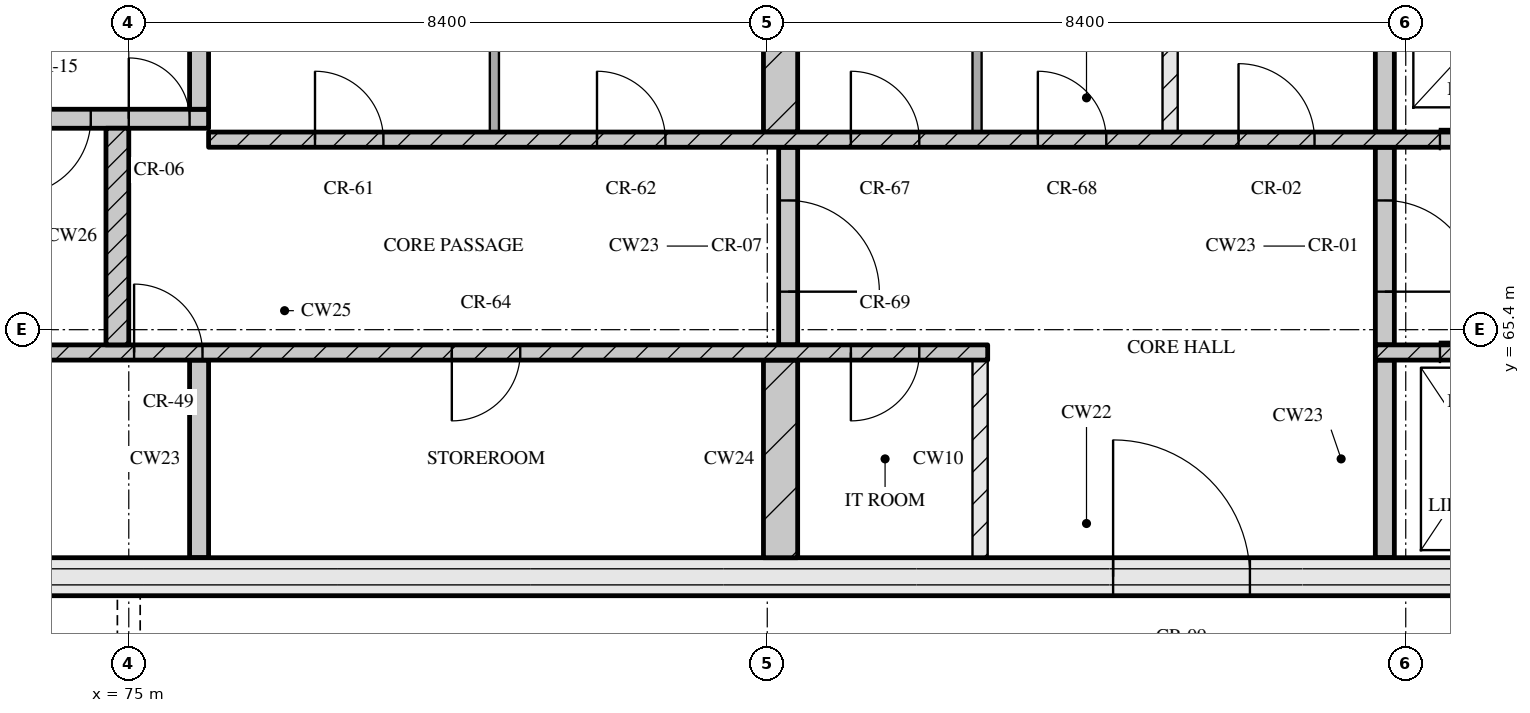
"""IFC4 building model, lengths in metres.
Left out: names, types, materials, properties, quantities, classifications, styles, units other than length and angle.
Written with IfcOpenShell. Run it as: python <this file> out.ifc"""

import sys

from ifc_helpers import new_model, si_unit, direction, frame, frame_2d, origin, place, context, subcontext, project, spatial, rectangle, extrude, element, fill, save


model = new_model("IFC4")
c1 = context("Model", 3, precision=1e-05, world=origin(), true_north=direction((0.0, 1.0)))
c2 = subcontext(c1, "Body", "Model", "MODEL_VIEW")
j1 = project(units=[si_unit("LENGTHUNIT", "METRE"), si_unit("PLANEANGLEUNIT", "RADIAN")], contexts=[c1])
p1 = place(None, origin())
s1 = spatial("IfcSite", under=j1, at=p1, CompositionType="ELEMENT")
p2 = place(p1, origin())
s2 = spatial("IfcBuilding", under=s1, at=p2, CompositionType="ELEMENT")
p3 = place(p2, frame((0.0, 0.0, 306.75)))
s3 = spatial("IfcBuildingStorey", under=s2, at=p3, CompositionType="ELEMENT", Elevation=306.75)
p4 = place(p3, frame((67.3, 62.15, 0.0), z_axis=(0.0, 0.0, 1.0), x_axis=(1.0, 0.0, 0.0)))
e1 = element("IfcWall", 1, at=p4, inside=s3, PredefinedType="SOLIDWALL", context=c2, shape_type="SweptSolid", body=[
    extrude(rectangle(XDim=40.6, YDim=0.5, at=frame_2d((20.3, 0.0))), origin(), (0.0, 0.0, 1.0), 3.3),
])
p5 = place(p4, frame((20.65, 0.0, 0.0)))
e2 = element("IfcOpeningElement", 2, at=p5, cuts=e1, PredefinedType="OPENING", context=c2, shape_type="SweptSolid", body=[
    extrude(rectangle(XDim=1.8, YDim=2.1, at=frame_2d((0.9, 1.05))), frame((0.0, 0.26, 0.0), z_axis=(0.0, -1.0, 0.0), x_axis=(1.0, 0.0, 0.0)), (0.0, 0.0, 1.0), 0.52),
])
p6 = place(p3, frame((75.925, 62.4, 0.0), z_axis=(0.0, 0.0, 1.0), x_axis=(0.0, 1.0, 0.0)))
e3 = element("IfcWall", 3, at=p6, inside=s3, PredefinedType="SOLIDWALL", context=c2, shape_type="SweptSolid", body=[
    extrude(rectangle(XDim=2.6, YDim=0.25, at=frame_2d((1.3, 0.0))), origin(), (0.0, 0.0, 1.0), 3.3),
])
p7 = place(p3, frame((83.575, 62.4, 0.0), z_axis=(0.0, 0.0, 1.0), x_axis=(0.0, 1.0, 0.0)))
e4 = element("IfcWall", 4, at=p7, inside=s3, PredefinedType="SOLIDWALL", context=c2, shape_type="SweptSolid", body=[
    extrude(rectangle(XDim=2.6, YDim=0.45, at=frame_2d((1.3, 0.0))), origin(), (0.0, 0.0, 1.0), 3.3),
])
p8 = place(p3, frame((86.2, 62.4, 0.0), z_axis=(0.0, 0.0, 1.0), x_axis=(0.0, 1.0, 0.0)))
e5 = element("IfcWall", 5, at=p8, inside=s3, PredefinedType="PARTITIONING", context=c2, shape_type="SweptSolid", body=[
    extrude(rectangle(XDim=2.6, YDim=0.2, at=frame_2d((1.3, 0.0))), origin(), (0.0, 0.0, 1.0), 3.3),
])
p9 = place(p3, frame((91.525, 62.4, 0.0), z_axis=(0.0, 0.0, 1.0), x_axis=(0.0, 1.0, 0.0)))
e6 = element("IfcWall", 6, at=p9, inside=s3, PredefinedType="SOLIDWALL", context=c2, shape_type="SweptSolid", body=[
    extrude(rectangle(XDim=2.6, YDim=0.25, at=frame_2d((1.3, 0.0))), origin(), (0.0, 0.0, 1.0), 3.3),
])
p10 = place(p3, frame((67.8, 65.1, 0.0), z_axis=(0.0, 0.0, 1.0), x_axis=(1.0, 0.0, 0.0)))
e7 = element("IfcWall", 7, at=p10, inside=s3, PredefinedType="SOLIDWALL", context=c2, shape_type="SweptSolid", body=[
    extrude(rectangle(XDim=18.5, YDim=0.2, at=frame_2d((9.25, 0.0))), origin(), (0.0, 0.0, 1.0), 3.3),
])
p11 = place(p10, frame((7.27, 0.0, 0.0)))
e8 = element("IfcOpeningElement", 8, at=p11, cuts=e7, PredefinedType="OPENING", context=c2, shape_type="SweptSolid", body=[
    extrude(rectangle(XDim=0.9, YDim=2.1, at=frame_2d((0.45, 1.05))), frame((0.0, 0.11, 0.0), z_axis=(0.0, -1.0, 0.0), x_axis=(1.0, 0.0, 0.0)), (0.0, 0.0, 1.0), 0.22),
])
p12 = place(p10, frame((11.45, 0.0, 0.0)))
e9 = element("IfcOpeningElement", 9, at=p12, cuts=e7, PredefinedType="OPENING", context=c2, shape_type="SweptSolid", body=[
    extrude(rectangle(XDim=0.9, YDim=2.1, at=frame_2d((0.45, 1.05))), frame((0.0, 0.11, 0.0), z_axis=(0.0, -1.0, 0.0), x_axis=(1.0, 0.0, 0.0)), (0.0, 0.0, 1.0), 0.22),
])
p13 = place(p10, frame((16.7, 0.0, 0.0)))
e10 = element("IfcOpeningElement", 10, at=p13, cuts=e7, PredefinedType="OPENING", context=c2, shape_type="SweptSolid", body=[
    extrude(rectangle(XDim=0.9, YDim=2.1, at=frame_2d((0.45, 1.05))), frame((0.0, 0.11, 0.0), z_axis=(0.0, -1.0, 0.0), x_axis=(1.0, 0.0, 0.0)), (0.0, 0.0, 1.0), 0.22),
])
p14 = place(p3, frame((91.4, 65.1, 0.0), z_axis=(0.0, 0.0, 1.0), x_axis=(1.0, 0.0, 0.0)))
e11 = element("IfcWall", 11, at=p14, inside=s3, PredefinedType="SOLIDWALL", context=c2, shape_type="SweptSolid", body=[
    extrude(rectangle(XDim=16.0, YDim=0.2, at=frame_2d((8.0, 0.0))), origin(), (0.0, 0.0, 1.0), 3.3),
])
p15 = place(p14, frame((0.85, 0.0, 0.0)))
e12 = element("IfcOpeningElement", 12, at=p15, cuts=e11, PredefinedType="OPENING", context=c2, shape_type="SweptSolid", body=[
    extrude(rectangle(XDim=1.1, YDim=2.1, at=frame_2d((0.55, 1.05))), frame((0.0, 0.11, 0.0), z_axis=(0.0, -1.0, 0.0), x_axis=(1.0, 0.0, 0.0)), (0.0, 0.0, 1.0), 0.22),
])
p16 = place(p14, frame((3.35, 0.0, 0.0)))
e13 = element("IfcOpeningElement", 13, at=p16, cuts=e11, PredefinedType="OPENING", context=c2, shape_type="SweptSolid", body=[
    extrude(rectangle(XDim=1.1, YDim=2.1, at=frame_2d((0.55, 1.05))), frame((0.0, 0.11, 0.0), z_axis=(0.0, -1.0, 0.0), x_axis=(1.0, 0.0, 0.0)), (0.0, 0.0, 1.0), 0.22),
])
p17 = place(p14, frame((5.85, 0.0, 0.0)))
e14 = element("IfcOpeningElement", 14, at=p17, cuts=e11, PredefinedType="OPENING", context=c2, shape_type="SweptSolid", body=[
    extrude(rectangle(XDim=1.1, YDim=2.1, at=frame_2d((0.55, 1.05))), frame((0.0, 0.11, 0.0), z_axis=(0.0, -1.0, 0.0), x_axis=(1.0, 0.0, 0.0)), (0.0, 0.0, 1.0), 0.22),
])
p18 = place(p14, frame((7.83, 0.0, 0.0)))
e15 = element("IfcOpeningElement", 15, at=p18, cuts=e11, PredefinedType="OPENING", context=c2, shape_type="SweptSolid", body=[
    extrude(rectangle(XDim=0.9, YDim=2.1, at=frame_2d((0.45, 1.05))), frame((0.0, 0.11, 0.0), z_axis=(0.0, -1.0, 0.0), x_axis=(1.0, 0.0, 0.0)), (0.0, 0.0, 1.0), 0.22),
])
p19 = place(p3, frame((74.85, 65.2, 0.0), z_axis=(0.0, 0.0, 1.0), x_axis=(0.0, 1.0, 0.0)))
e16 = element("IfcWall", 16, at=p19, inside=s3, PredefinedType="SOLIDWALL", context=c2, shape_type="SweptSolid", body=[
    extrude(rectangle(XDim=2.85, YDim=0.3, at=frame_2d((1.425, 0.0))), origin(), (0.0, 0.0, 1.0), 3.3),
])
p20 = place(p3, frame((83.675, 65.2, 0.0), z_axis=(0.0, 0.0, 1.0), x_axis=(0.0, 1.0, 0.0)))
e17 = element("IfcWall", 17, at=p20, inside=s3, PredefinedType="SOLIDWALL", context=c2, shape_type="SweptSolid", body=[
    extrude(rectangle(XDim=2.6, YDim=0.25, at=frame_2d((1.3, 0.0))), origin(), (0.0, 0.0, 1.0), 3.3),
])
p21 = place(p20, frame((0.7, 0.0, 0.0)))
e18 = element("IfcOpeningElement", 18, at=p21, cuts=e17, PredefinedType="OPENING", context=c2, shape_type="SweptSolid", body=[
    extrude(rectangle(XDim=1.2, YDim=2.1, at=frame_2d((0.6, 1.05))), frame((0.0, 0.135, 0.0), z_axis=(0.0, -1.0, 0.0), x_axis=(1.0, 0.0, 0.0)), (0.0, 0.0, 1.0), 0.27),
])
p22 = place(p3, frame((91.525, 65.2, 0.0), z_axis=(0.0, 0.0, 1.0), x_axis=(0.0, 1.0, 0.0)))
e19 = element("IfcWall", 19, at=p22, inside=s3, PredefinedType="SOLIDWALL", context=c2, shape_type="SweptSolid", body=[
    extrude(rectangle(XDim=2.6, YDim=0.25, at=frame_2d((1.3, 0.0))), origin(), (0.0, 0.0, 1.0), 3.3),
])
p23 = place(p22, frame((0.7, 0.0, 0.0)))
e20 = element("IfcOpeningElement", 20, at=p23, cuts=e19, PredefinedType="OPENING", context=c2, shape_type="SweptSolid", body=[
    extrude(rectangle(XDim=1.2, YDim=2.1, at=frame_2d((0.6, 1.05))), frame((0.0, 0.135, 0.0), z_axis=(0.0, -1.0, 0.0), x_axis=(1.0, 0.0, 0.0)), (0.0, 0.0, 1.0), 0.27),
])
p24 = place(p3, frame((76.05, 67.9, 0.0), z_axis=(0.0, 0.0, 1.0), x_axis=(1.0, 0.0, 0.0)))
e21 = element("IfcWall", 21, at=p24, inside=s3, PredefinedType="SOLIDWALL", context=c2, shape_type="SweptSolid", body=[
    extrude(rectangle(XDim=23.1, YDim=0.2, at=frame_2d((11.55, 0.0))), origin(), (0.0, 0.0, 1.0), 3.3),
])
p25 = place(p24, frame((1.4, 0.0, 0.0)))
e22 = element("IfcOpeningElement", 22, at=p25, cuts=e21, PredefinedType="OPENING", context=c2, shape_type="SweptSolid", body=[
    extrude(rectangle(XDim=0.9, YDim=2.1, at=frame_2d((0.45, 1.05))), frame((0.0, 0.11, 0.0), z_axis=(0.0, -1.0, 0.0), x_axis=(1.0, 0.0, 0.0)), (0.0, 0.0, 1.0), 0.22),
])
p26 = place(p24, frame((5.11, 0.0, 0.0)))
e23 = element("IfcOpeningElement", 23, at=p26, cuts=e21, PredefinedType="OPENING", context=c2, shape_type="SweptSolid", body=[
    extrude(rectangle(XDim=0.9, YDim=2.1, at=frame_2d((0.45, 1.05))), frame((0.0, 0.11, 0.0), z_axis=(0.0, -1.0, 0.0), x_axis=(1.0, 0.0, 0.0)), (0.0, 0.0, 1.0), 0.22),
])
p27 = place(p24, frame((8.45, 0.0, 0.0)))
e24 = element("IfcOpeningElement", 24, at=p27, cuts=e21, PredefinedType="OPENING", context=c2, shape_type="SweptSolid", body=[
    extrude(rectangle(XDim=0.9, YDim=2.1, at=frame_2d((0.45, 1.05))), frame((0.0, 0.11, 0.0), z_axis=(0.0, -1.0, 0.0), x_axis=(1.0, 0.0, 0.0)), (0.0, 0.0, 1.0), 0.22),
])
p28 = place(p24, frame((10.91, 0.0, 0.0)))
e25 = element("IfcOpeningElement", 25, at=p28, cuts=e21, PredefinedType="OPENING", context=c2, shape_type="SweptSolid", body=[
    extrude(rectangle(XDim=0.9, YDim=2.1, at=frame_2d((0.45, 1.05))), frame((0.0, 0.11, 0.0), z_axis=(0.0, -1.0, 0.0), x_axis=(1.0, 0.0, 0.0)), (0.0, 0.0, 1.0), 0.22),
])
p29 = place(p24, frame((13.55, 0.0, 0.0)))
e26 = element("IfcOpeningElement", 26, at=p29, cuts=e21, PredefinedType="OPENING", context=c2, shape_type="SweptSolid", body=[
    extrude(rectangle(XDim=1.0, YDim=2.1, at=frame_2d((0.5, 1.05))), frame((0.0, 0.11, 0.0), z_axis=(0.0, -1.0, 0.0), x_axis=(1.0, 0.0, 0.0)), (0.0, 0.0, 1.0), 0.22),
])
p30 = place(p24, frame((16.2, 0.0, 0.0)))
e27 = element("IfcOpeningElement", 27, at=p30, cuts=e21, PredefinedType="OPENING", context=c2, shape_type="SweptSolid", body=[
    extrude(rectangle(XDim=1.1, YDim=2.1, at=frame_2d((0.55, 1.05))), frame((0.0, 0.11, 0.0), z_axis=(0.0, -1.0, 0.0), x_axis=(1.0, 0.0, 0.0)), (0.0, 0.0, 1.0), 0.22),
])
p31 = place(p24, frame((18.7, 0.0, 0.0)))
e28 = element("IfcOpeningElement", 28, at=p31, cuts=e21, PredefinedType="OPENING", context=c2, shape_type="SweptSolid", body=[
    extrude(rectangle(XDim=1.1, YDim=2.1, at=frame_2d((0.55, 1.05))), frame((0.0, 0.11, 0.0), z_axis=(0.0, -1.0, 0.0), x_axis=(1.0, 0.0, 0.0)), (0.0, 0.0, 1.0), 0.22),
])
p32 = place(p24, frame((21.2, 0.0, 0.0)))
e29 = element("IfcOpeningElement", 29, at=p32, cuts=e21, PredefinedType="OPENING", context=c2, shape_type="SweptSolid", body=[
    extrude(rectangle(XDim=1.1, YDim=2.1, at=frame_2d((0.55, 1.05))), frame((0.0, 0.11, 0.0), z_axis=(0.0, -1.0, 0.0), x_axis=(1.0, 0.0, 0.0)), (0.0, 0.0, 1.0), 0.22),
])
p33 = place(p3, frame((79.81, 68.0, 0.0), z_axis=(0.0, 0.0, 1.0), x_axis=(0.0, 1.0, 0.0)))
e30 = element("IfcWall", 30, at=p33, inside=s3, PredefinedType="PARTITIONING", context=c2, shape_type="SweptSolid", body=[
    extrude(rectangle(XDim=2.6, YDim=0.12, at=frame_2d((1.3, 0.0))), origin(), (0.0, 0.0, 1.0), 3.3),
])
p34 = place(p3, frame((83.575, 68.0, 0.0), z_axis=(0.0, 0.0, 1.0), x_axis=(0.0, 1.0, 0.0)))
e31 = element("IfcWall", 31, at=p34, inside=s3, PredefinedType="SOLIDWALL", context=c2, shape_type="SweptSolid", body=[
    extrude(rectangle(XDim=2.6, YDim=0.45, at=frame_2d((1.3, 0.0))), origin(), (0.0, 0.0, 1.0), 3.3),
])
p35 = place(p3, frame((86.16, 68.0, 0.0), z_axis=(0.0, 0.0, 1.0), x_axis=(0.0, 1.0, 0.0)))
e32 = element("IfcWall", 32, at=p35, inside=s3, PredefinedType="PARTITIONING", context=c2, shape_type="SweptSolid", body=[
    extrude(rectangle(XDim=2.6, YDim=0.12, at=frame_2d((1.3, 0.0))), origin(), (0.0, 0.0, 1.0), 3.3),
])
p36 = place(p3, frame((88.7, 68.0, 0.0), z_axis=(0.0, 0.0, 1.0), x_axis=(0.0, 1.0, 0.0)))
e33 = element("IfcWall", 33, at=p36, inside=s3, PredefinedType="PARTITIONING", context=c2, shape_type="SweptSolid", body=[
    extrude(rectangle(XDim=2.6, YDim=0.2, at=frame_2d((1.3, 0.0))), origin(), (0.0, 0.0, 1.0), 3.3),
])
p37 = place(p3, frame((91.525, 68.0, 0.0), z_axis=(0.0, 0.0, 1.0), x_axis=(0.0, 1.0, 0.0)))
e34 = element("IfcWall", 34, at=p37, inside=s3, PredefinedType="SOLIDWALL", context=c2, shape_type="SweptSolid", body=[
    extrude(rectangle(XDim=2.6, YDim=0.25, at=frame_2d((1.3, 0.0))), origin(), (0.0, 0.0, 1.0), 3.3),
])
p38 = place(p3, frame((67.8, 68.175, 0.0), z_axis=(0.0, 0.0, 1.0), x_axis=(1.0, 0.0, 0.0)))
e35 = element("IfcWall", 35, at=p38, inside=s3, PredefinedType="SOLIDWALL", context=c2, shape_type="SweptSolid", body=[
    extrude(rectangle(XDim=8.25, YDim=0.25, at=frame_2d((4.125, 0.0))), origin(), (0.0, 0.0, 1.0), 3.3),
])
p39 = place(p38, frame((5.7, 0.0, 0.0)))
e36 = element("IfcOpeningElement", 36, at=p39, cuts=e35, PredefinedType="OPENING", context=c2, shape_type="SweptSolid", body=[
    extrude(rectangle(XDim=1.0, YDim=2.1, at=frame_2d((0.5, 1.05))), frame((0.0, 0.135, 0.0), z_axis=(0.0, -1.0, 0.0), x_axis=(1.0, 0.0, 0.0)), (0.0, 0.0, 1.0), 0.27),
])
p40 = place(p38, frame((7.2, 0.0, 0.0)))
e37 = element("IfcOpeningElement", 37, at=p40, cuts=e35, PredefinedType="OPENING", context=c2, shape_type="SweptSolid", body=[
    extrude(rectangle(XDim=0.8, YDim=2.1, at=frame_2d((0.4, 1.05))), frame((0.0, 0.135, 0.0), z_axis=(0.0, -1.0, 0.0), x_axis=(1.0, 0.0, 0.0)), (0.0, 0.0, 1.0), 0.27),
])
p41 = place(p3, frame((75.925, 68.3, 0.0), z_axis=(0.0, 0.0, 1.0), x_axis=(0.0, 1.0, 0.0)))
e38 = element("IfcWall", 38, at=p41, inside=s3, PredefinedType="SOLIDWALL", context=c2, shape_type="SweptSolid", body=[
    extrude(rectangle(XDim=2.3, YDim=0.25, at=frame_2d((1.15, 0.0))), origin(), (0.0, 0.0, 1.0), 3.3),
])
p42 = place(p5, origin())
e39 = element("IfcDoor", 39, at=p42, inside=s3, OperationType="DOUBLE_DOOR_SINGLE_SWING", PredefinedType="DOOR", context=c2, shape_type="SweptSolid", body=[
    extrude(rectangle(XDim=1.8, YDim=2.1, at=frame_2d((0.9, 1.05))), frame((0.0, 0.025, 0.0), z_axis=(0.0, -1.0, 0.0), x_axis=(1.0, 0.0, 0.0)), (0.0, 0.0, 1.0), 0.05),
])
fill(e2, e39)
p43 = place(p11, origin())
e40 = element("IfcDoor", 40, at=p43, inside=s3, OperationType="SINGLE_SWING_LEFT", PredefinedType="DOOR", context=c2, shape_type="SweptSolid", body=[
    extrude(rectangle(XDim=0.9, YDim=2.1, at=frame_2d((0.45, 1.05))), frame((0.0, 0.025, 0.0), z_axis=(0.0, -1.0, 0.0), x_axis=(1.0, 0.0, 0.0)), (0.0, 0.0, 1.0), 0.05),
])
fill(e8, e40)
p44 = place(p12, origin())
e41 = element("IfcDoor", 41, at=p44, inside=s3, OperationType="SINGLE_SWING_RIGHT", PredefinedType="DOOR", context=c2, shape_type="SweptSolid", body=[
    extrude(rectangle(XDim=0.9, YDim=2.1, at=frame_2d((0.45, 1.05))), frame((0.0, 0.025, 0.0), z_axis=(0.0, -1.0, 0.0), x_axis=(1.0, 0.0, 0.0)), (0.0, 0.0, 1.0), 0.05),
])
fill(e9, e41)
p45 = place(p13, origin())
e42 = element("IfcDoor", 42, at=p45, inside=s3, OperationType="SINGLE_SWING_RIGHT", PredefinedType="DOOR", context=c2, shape_type="SweptSolid", body=[
    extrude(rectangle(XDim=0.9, YDim=2.1, at=frame_2d((0.45, 1.05))), frame((0.0, 0.025, 0.0), z_axis=(0.0, -1.0, 0.0), x_axis=(1.0, 0.0, 0.0)), (0.0, 0.0, 1.0), 0.05),
])
fill(e10, e42)
p46 = place(p15, origin())
e43 = element("IfcDoor", 43, at=p46, inside=s3, OperationType="SLIDING_TO_LEFT", PredefinedType="DOOR", context=c2, shape_type="SweptSolid", body=[
    extrude(rectangle(XDim=1.1, YDim=2.1, at=frame_2d((0.55, 1.05))), frame((0.0, 0.025, 0.0), z_axis=(0.0, -1.0, 0.0), x_axis=(1.0, 0.0, 0.0)), (0.0, 0.0, 1.0), 0.05),
])
fill(e12, e43)
p47 = place(p21, origin())
e44 = element("IfcDoor", 44, at=p47, inside=s3, OperationType="SINGLE_SWING_RIGHT", PredefinedType="DOOR", context=c2, shape_type="SweptSolid", body=[
    extrude(rectangle(XDim=1.2, YDim=2.1, at=frame_2d((0.6, 1.05))), frame((0.0, 0.025, 0.0), z_axis=(0.0, -1.0, 0.0), x_axis=(1.0, 0.0, 0.0)), (0.0, 0.0, 1.0), 0.05),
])
fill(e18, e44)
p48 = place(p23, origin())
e45 = element("IfcDoor", 45, at=p48, inside=s3, OperationType="SINGLE_SWING_RIGHT", PredefinedType="DOOR", context=c2, shape_type="SweptSolid", body=[
    extrude(rectangle(XDim=1.2, YDim=2.1, at=frame_2d((0.6, 1.05))), frame((0.0, 0.025, 0.0), z_axis=(0.0, -1.0, 0.0), x_axis=(1.0, 0.0, 0.0)), (0.0, 0.0, 1.0), 0.05),
])
fill(e20, e45)
p49 = place(p25, origin())
e46 = element("IfcDoor", 46, at=p49, inside=s3, OperationType="SINGLE_SWING_LEFT", PredefinedType="DOOR", context=c2, shape_type="SweptSolid", body=[
    extrude(rectangle(XDim=0.9, YDim=2.1, at=frame_2d((0.45, 1.05))), frame((0.0, 0.025, 0.0), z_axis=(0.0, -1.0, 0.0), x_axis=(1.0, 0.0, 0.0)), (0.0, 0.0, 1.0), 0.05),
])
fill(e22, e46)
p50 = place(p26, origin())
e47 = element("IfcDoor", 47, at=p50, inside=s3, OperationType="SINGLE_SWING_LEFT", PredefinedType="DOOR", context=c2, shape_type="SweptSolid", body=[
    extrude(rectangle(XDim=0.9, YDim=2.1, at=frame_2d((0.45, 1.05))), frame((0.0, 0.025, 0.0), z_axis=(0.0, -1.0, 0.0), x_axis=(1.0, 0.0, 0.0)), (0.0, 0.0, 1.0), 0.05),
])
fill(e23, e47)
p51 = place(p27, origin())
e48 = element("IfcDoor", 48, at=p51, inside=s3, OperationType="SINGLE_SWING_LEFT", PredefinedType="DOOR", context=c2, shape_type="SweptSolid", body=[
    extrude(rectangle(XDim=0.9, YDim=2.1, at=frame_2d((0.45, 1.05))), frame((0.0, 0.025, 0.0), z_axis=(0.0, -1.0, 0.0), x_axis=(1.0, 0.0, 0.0)), (0.0, 0.0, 1.0), 0.05),
])
fill(e24, e48)
p52 = place(p28, origin())
e49 = element("IfcDoor", 49, at=p52, inside=s3, OperationType="SINGLE_SWING_LEFT", PredefinedType="DOOR", context=c2, shape_type="SweptSolid", body=[
    extrude(rectangle(XDim=0.9, YDim=2.1, at=frame_2d((0.45, 1.05))), frame((0.0, 0.025, 0.0), z_axis=(0.0, -1.0, 0.0), x_axis=(1.0, 0.0, 0.0)), (0.0, 0.0, 1.0), 0.05),
])
fill(e25, e49)
p53 = place(p29, origin())
e50 = element("IfcDoor", 50, at=p53, inside=s3, OperationType="SINGLE_SWING_LEFT", PredefinedType="DOOR", context=c2, shape_type="SweptSolid", body=[
    extrude(rectangle(XDim=1.0, YDim=2.1, at=frame_2d((0.5, 1.05))), frame((0.0, 0.025, 0.0), z_axis=(0.0, -1.0, 0.0), x_axis=(1.0, 0.0, 0.0)), (0.0, 0.0, 1.0), 0.05),
])
fill(e26, e50)
p54 = place(p30, origin())
e51 = element("IfcDoor", 51, at=p54, inside=s3, OperationType="SLIDING_TO_RIGHT", PredefinedType="DOOR", context=c2, shape_type="SweptSolid", body=[
    extrude(rectangle(XDim=1.1, YDim=2.1, at=frame_2d((0.55, 1.05))), frame((0.0, 0.025, 0.0), z_axis=(0.0, -1.0, 0.0), x_axis=(1.0, 0.0, 0.0)), (0.0, 0.0, 1.0), 0.05),
])
fill(e27, e51)
p55 = place(p39, origin())
e52 = element("IfcDoor", 52, at=p55, inside=s3, OperationType="SINGLE_SWING_RIGHT", PredefinedType="DOOR", context=c2, shape_type="SweptSolid", body=[
    extrude(rectangle(XDim=1.0, YDim=2.1, at=frame_2d((0.5, 1.05))), frame((0.0, 0.025, 0.0), z_axis=(0.0, -1.0, 0.0), x_axis=(1.0, 0.0, 0.0)), (0.0, 0.0, 1.0), 0.05),
])
fill(e36, e52)
p56 = place(p40, origin())
e53 = element("IfcDoor", 53, at=p56, inside=s3, OperationType="SINGLE_SWING_LEFT", PredefinedType="DOOR", context=c2, shape_type="SweptSolid", body=[
    extrude(rectangle(XDim=0.8, YDim=2.1, at=frame_2d((0.4, 1.05))), frame((0.0, 0.025, 0.0), z_axis=(0.0, -1.0, 0.0), x_axis=(1.0, 0.0, 0.0)), (0.0, 0.0, 1.0), 0.05),
])
fill(e37, e53)
save(model, sys.argv[1])
